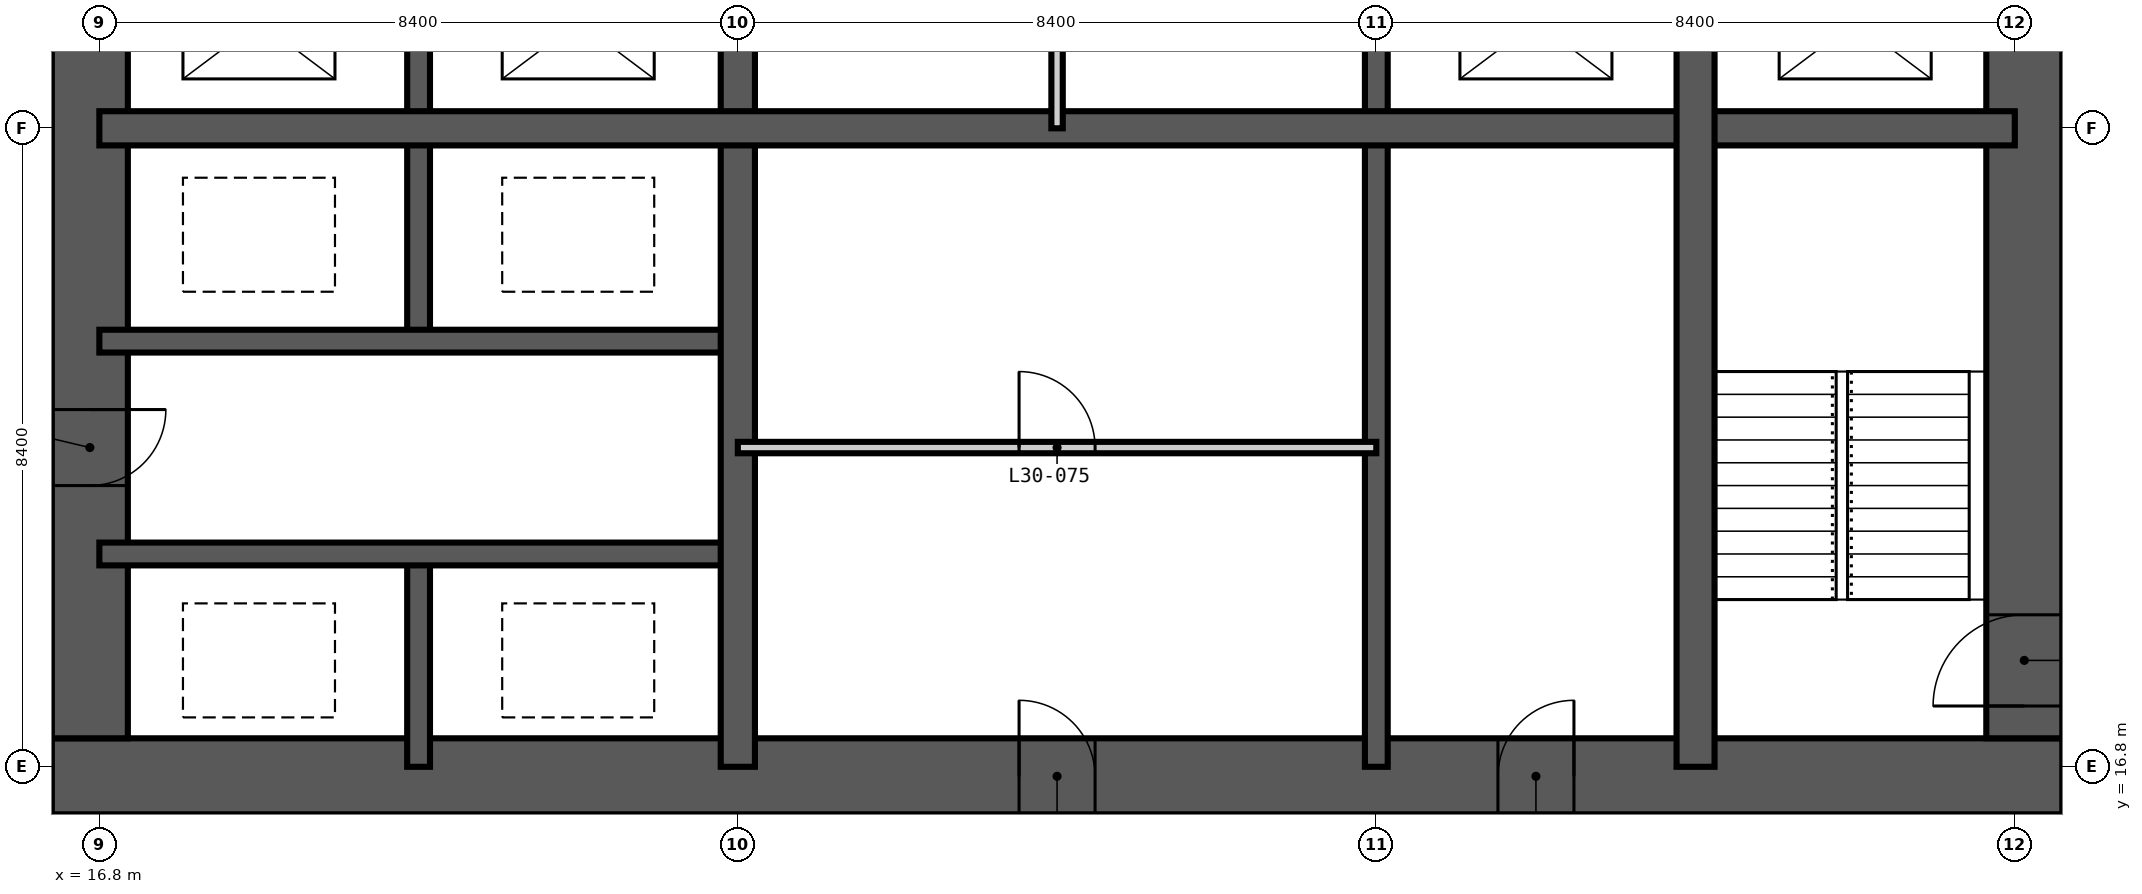
"""IFC4 building model, lengths in metres.
Left out: names, types, materials, properties, quantities, classifications, styles, units other than length and angle.
Written with IfcOpenShell. Run it as: python <this file> out.ifc"""

import sys

from ifc_helpers import new_model, si_unit, direction, frame, frame_2d, origin, place, context, subcontext, project, spatial, rectangle, extrude, element, fill, save


model = new_model("IFC4")
c1 = context("Model", 3, precision=1e-05, world=origin(), true_north=direction((0.0, 1.0)))
c2 = subcontext(c1, "Body", "Model", "MODEL_VIEW")
j1 = project(units=[si_unit("LENGTHUNIT", "METRE"), si_unit("PLANEANGLEUNIT", "RADIAN")], contexts=[c1])
p1 = place(None, origin())
s1 = spatial("IfcSite", under=j1, at=p1, CompositionType="ELEMENT")
p2 = place(p1, origin())
s2 = spatial("IfcBuilding", under=s1, at=p2, CompositionType="ELEMENT")
p3 = place(p2, frame((0.0, 0.0, 118.8)))
s3 = spatial("IfcBuildingStorey", under=s2, at=p3, CompositionType="ELEMENT", Elevation=118.8)
p4 = place(p3, frame((16.175, 16.675, -0.35), z_axis=(0.0, 0.0, 1.0), x_axis=(1.0, 0.0, 0.0)))
e1 = element("IfcWall", 1, at=p4, inside=s3, PredefinedType="SHEAR", context=c2, shape_type="SweptSolid", body=[
    extrude(rectangle(XDim=26.45, YDim=1.0, at=frame_2d((13.225, 0.0))), origin(), (0.0, 0.0, 1.0), 3.6),
])
p5 = place(p4, frame((12.725, 0.0, 0.35)))
e2 = element("IfcOpeningElement", 2, at=p5, cuts=e1, PredefinedType="OPENING", context=c2, shape_type="SweptSolid", body=[
    extrude(rectangle(XDim=1.0, YDim=2.1, at=frame_2d((0.5, 1.05))), frame((0.0, 0.51, 0.0), z_axis=(0.0, -1.0, 0.0), x_axis=(1.0, 0.0, 0.0)), (0.0, 0.0, 1.0), 1.02),
])
p6 = place(p4, frame((19.025, 0.0, 0.35)))
e3 = element("IfcOpeningElement", 3, at=p6, cuts=e1, PredefinedType="OPENING", context=c2, shape_type="SweptSolid", body=[
    extrude(rectangle(XDim=1.0, YDim=2.1, at=frame_2d((0.5, 1.05))), frame((0.0, 0.51, 0.0), z_axis=(0.0, -1.0, 0.0), x_axis=(1.0, 0.0, 0.0)), (0.0, 0.0, 1.0), 1.02),
])
p7 = place(p3, frame((42.125, 17.175, -0.35), z_axis=(0.0, 0.0, 1.0), x_axis=(0.0, 1.0, 0.0)))
e4 = element("IfcWall", 4, at=p7, inside=s3, PredefinedType="SHEAR", context=c2, shape_type="SweptSolid", body=[
    extrude(rectangle(XDim=24.45, YDim=1.0, at=frame_2d((12.225, 0.0))), origin(), (0.0, 0.0, 1.0), 3.6),
])
p8 = place(p7, frame((0.425, 0.0, 0.35)))
e5 = element("IfcOpeningElement", 5, at=p8, cuts=e4, PredefinedType="OPENING", context=c2, shape_type="SweptSolid", body=[
    extrude(rectangle(XDim=1.2, YDim=2.2, at=frame_2d((0.6, 1.1))), frame((0.0, 0.51, 0.0), z_axis=(0.0, -1.0, 0.0), x_axis=(1.0, 0.0, 0.0)), (0.0, 0.0, 1.0), 1.02),
])
p9 = place(p7, frame((11.325, 0.0, 0.35)))
e6 = element("IfcOpeningElement", 6, at=p9, cuts=e4, PredefinedType="OPENING", context=c2, shape_type="SweptSolid", body=[
    extrude(rectangle(XDim=1.8, YDim=2.2, at=frame_2d((0.9, 1.1))), frame((0.0, 0.51, 0.0), z_axis=(0.0, -1.0, 0.0), x_axis=(1.0, 0.0, 0.0)), (0.0, 0.0, 1.0), 1.02),
])
p10 = place(p7, frame((20.125, 0.0, 0.35)))
e7 = element("IfcOpeningElement", 7, at=p10, cuts=e4, PredefinedType="OPENING", context=c2, shape_type="SweptSolid", body=[
    extrude(rectangle(XDim=1.0, YDim=2.1, at=frame_2d((0.5, 1.05))), frame((0.0, 0.51, 0.0), z_axis=(0.0, -1.0, 0.0), x_axis=(1.0, 0.0, 0.0)), (0.0, 0.0, 1.0), 1.02),
])
p11 = place(p3, frame((16.675, 41.625, -0.35), z_axis=(0.0, 0.0, 1.0), x_axis=(0.0, -1.0, 0.0)))
e8 = element("IfcWall", 8, at=p11, inside=s3, PredefinedType="SHEAR", context=c2, shape_type="SweptSolid", body=[
    extrude(rectangle(XDim=24.45, YDim=1.0, at=frame_2d((12.225, 0.0))), origin(), (0.0, 0.0, 1.0), 3.6),
])
p12 = place(p11, frame((11.325, 0.0, 0.35)))
e9 = element("IfcOpeningElement", 9, at=p12, cuts=e8, PredefinedType="OPENING", context=c2, shape_type="SweptSolid", body=[
    extrude(rectangle(XDim=1.8, YDim=2.2, at=frame_2d((0.9, 1.1))), frame((0.0, 0.51, 0.0), z_axis=(0.0, -1.0, 0.0), x_axis=(1.0, 0.0, 0.0)), (0.0, 0.0, 1.0), 1.02),
])
p13 = place(p11, frame((20.125, 0.0, 0.35)))
e10 = element("IfcOpeningElement", 10, at=p13, cuts=e8, PredefinedType="OPENING", context=c2, shape_type="SweptSolid", body=[
    extrude(rectangle(XDim=1.0, YDim=2.1, at=frame_2d((0.5, 1.05))), frame((0.0, 0.51, 0.0), z_axis=(0.0, -1.0, 0.0), x_axis=(1.0, 0.0, 0.0)), (0.0, 0.0, 1.0), 1.02),
])
p14 = place(p11, frame((5.425, 0.0, 0.35)))
e11 = element("IfcOpeningElement", 11, at=p14, cuts=e8, PredefinedType="OPENING", context=c2, shape_type="SweptSolid", body=[
    extrude(rectangle(XDim=1.0, YDim=2.1, at=frame_2d((0.5, 1.05))), frame((0.0, 0.51, 0.0), z_axis=(0.0, -1.0, 0.0), x_axis=(1.0, 0.0, 0.0)), (0.0, 0.0, 1.0), 1.02),
])
p15 = place(p3, frame((21.0, 16.8, -0.35), z_axis=(0.0, 0.0, 1.0), x_axis=(0.0, 1.0, 0.0)))
e12 = element("IfcWall", 12, at=p15, inside=s3, PredefinedType="SHEAR", context=c2, shape_type="SweptSolid", body=[
    extrude(rectangle(XDim=2.8, YDim=0.3, at=frame_2d((1.4, 0.0))), origin(), (0.0, 0.0, 1.0), 3.6),
])
p16 = place(p3, frame((21.0, 22.4, -0.35), z_axis=(0.0, 0.0, 1.0), x_axis=(0.0, 1.0, 0.0)))
e13 = element("IfcWall", 13, at=p16, inside=s3, PredefinedType="SHEAR", context=c2, shape_type="SweptSolid", body=[
    extrude(rectangle(XDim=5.6, YDim=0.3, at=frame_2d((2.8, 0.0))), origin(), (0.0, 0.0, 1.0), 3.6),
])
p17 = place(p3, frame((33.6, 16.8, -0.35), z_axis=(0.0, 0.0, 1.0), x_axis=(0.0, 1.0, 0.0)))
e14 = element("IfcWall", 14, at=p17, inside=s3, PredefinedType="SHEAR", context=c2, shape_type="SweptSolid", body=[
    extrude(rectangle(XDim=25.2, YDim=0.3, at=frame_2d((12.6, 0.0))), origin(), (0.0, 0.0, 1.0), 3.6),
])
p18 = place(p17, frame((22.5, 0.0, 0.35)))
e15 = element("IfcOpeningElement", 15, at=p18, cuts=e14, PredefinedType="OPENING", context=c2, shape_type="SweptSolid", body=[
    extrude(rectangle(XDim=1.2, YDim=2.2, at=frame_2d((0.6, 1.1))), frame((0.0, 0.16, 0.0), z_axis=(0.0, -1.0, 0.0), x_axis=(1.0, 0.0, 0.0)), (0.0, 0.0, 1.0), 0.32),
])
p19 = place(p17, frame((18.3, 0.0, 0.35)))
e16 = element("IfcOpeningElement", 16, at=p19, cuts=e14, PredefinedType="OPENING", context=c2, shape_type="SweptSolid", body=[
    extrude(rectangle(XDim=1.2, YDim=2.2, at=frame_2d((0.6, 1.1))), frame((0.0, 0.16, 0.0), z_axis=(0.0, -1.0, 0.0), x_axis=(1.0, 0.0, 0.0)), (0.0, 0.0, 1.0), 0.32),
])
for number, where, z_axis, x_axis in (
    (17, (16.8, 19.6, -0.35), (0.0, 0.0, 1.0), (1.0, 0.0, 0.0)),
    (18, (16.8, 22.4, -0.35), (0.0, 0.0, 1.0), (1.0, 0.0, 0.0)),
):
    element("IfcWall", number, at=place(p3, frame(where, z_axis=z_axis, x_axis=x_axis)), inside=s3, PredefinedType="SHEAR", context=c2, shape_type="SweptSolid", body=[
        extrude(rectangle(XDim=8.4, YDim=0.3, at=frame_2d((4.2, 0.0))), origin(), (0.0, 0.0, 1.0), 3.6),
    ])
p20 = place(p3, frame((25.2, 16.8, -0.35), z_axis=(0.0, 0.0, 1.0), x_axis=(0.0, 1.0, 0.0)))
e19 = element("IfcWall", 19, at=p20, inside=s3, PredefinedType="SHEAR", context=c2, shape_type="SweptSolid", body=[
    extrude(rectangle(XDim=25.2, YDim=0.45, at=frame_2d((12.6, 0.0))), origin(), (0.0, 0.0, 1.0), 3.6),
])
p21 = place(p20, frame((12.1, 0.0, 0.35)))
e20 = element("IfcOpeningElement", 20, at=p21, cuts=e19, PredefinedType="OPENING", context=c2, shape_type="SweptSolid", body=[
    extrude(rectangle(XDim=1.0, YDim=2.1, at=frame_2d((0.5, 1.05))), frame((0.0, 0.235, 0.0), z_axis=(0.0, -1.0, 0.0), x_axis=(1.0, 0.0, 0.0)), (0.0, 0.0, 1.0), 0.47),
])
p22 = place(p3, frame((16.8, 25.2, -0.35), z_axis=(0.0, 0.0, 1.0), x_axis=(1.0, 0.0, 0.0)))
e21 = element("IfcWall", 21, at=p22, inside=s3, PredefinedType="SHEAR", context=c2, shape_type="SweptSolid", body=[
    extrude(rectangle(XDim=25.2, YDim=0.45, at=frame_2d((12.6, 0.0))), origin(), (0.0, 0.0, 1.0), 3.6),
])
p23 = place(p3, frame((37.8, 16.8, -0.35), z_axis=(0.0, 0.0, 1.0), x_axis=(0.0, 1.0, 0.0)))
e22 = element("IfcWall", 22, at=p23, inside=s3, PredefinedType="SHEAR", context=c2, shape_type="SweptSolid", body=[
    extrude(rectangle(XDim=11.2, YDim=0.5, at=frame_2d((5.6, 0.0))), origin(), (0.0, 0.0, 1.0), 3.6),
])
p24 = place(p3, frame((29.4, 25.2, 0.0), z_axis=(0.0, 0.0, 1.0), x_axis=(0.0, 1.0, 0.0)))
e23 = element("IfcWall", 23, at=p24, inside=s3, PredefinedType="PARTITIONING", context=c2, shape_type="SweptSolid", body=[
    extrude(rectangle(XDim=2.8, YDim=0.15, at=frame_2d((1.4, 0.0))), origin(), (0.0, 0.0, 1.0), 3.25),
])
p25 = place(p3, frame((25.2, 21.0, 0.0), z_axis=(0.0, 0.0, 1.0), x_axis=(1.0, 0.0, 0.0)))
e24 = element("IfcWall", 24, at=p25, inside=s3, PredefinedType="PARTITIONING", context=c2, shape_type="SweptSolid", body=[
    extrude(rectangle(XDim=8.4, YDim=0.15, at=frame_2d((4.2, 0.0))), origin(), (0.0, 0.0, 1.0), 3.25),
])
p26 = place(p25, frame((3.7, 0.0, 0.0)))
e25 = element("IfcOpeningElement", 25, at=p26, cuts=e24, PredefinedType="OPENING", context=c2, shape_type="SweptSolid", body=[
    extrude(rectangle(XDim=1.0, YDim=2.1, at=frame_2d((0.5, 1.05))), frame((0.0, 0.085, 0.0), z_axis=(0.0, -1.0, 0.0), x_axis=(1.0, 0.0, 0.0)), (0.0, 0.0, 1.0), 0.17),
])
p27 = place(p8, origin())
e26 = element("IfcDoor", 26, at=p27, inside=s3, OperationType="SINGLE_SWING_LEFT", PredefinedType="DOOR", context=c2, shape_type="SweptSolid", body=[
    extrude(rectangle(XDim=1.2, YDim=2.2, at=frame_2d((0.6, 1.1))), frame((0.0, 0.025, 0.0), z_axis=(0.0, -1.0, 0.0), x_axis=(1.0, 0.0, 0.0)), (0.0, 0.0, 1.0), 0.05),
])
fill(e5, e26)
p28 = place(p13, origin())
e27 = element("IfcDoor", 27, at=p28, inside=s3, OperationType="SINGLE_SWING_LEFT", PredefinedType="DOOR", context=c2, shape_type="SweptSolid", body=[
    extrude(rectangle(XDim=1.0, YDim=2.1, at=frame_2d((0.5, 1.05))), frame((0.0, 0.025, 0.0), z_axis=(0.0, -1.0, 0.0), x_axis=(1.0, 0.0, 0.0)), (0.0, 0.0, 1.0), 0.05),
])
fill(e10, e27)
p29 = place(p5, origin())
e28 = element("IfcDoor", 28, at=p29, inside=s3, OperationType="SINGLE_SWING_LEFT", PredefinedType="DOOR", context=c2, shape_type="SweptSolid", body=[
    extrude(rectangle(XDim=1.0, YDim=2.1, at=frame_2d((0.5, 1.05))), frame((0.0, 0.025, 0.0), z_axis=(0.0, -1.0, 0.0), x_axis=(1.0, 0.0, 0.0)), (0.0, 0.0, 1.0), 0.05),
])
fill(e2, e28)
p30 = place(p26, origin())
e29 = element("IfcDoor", 29, at=p30, inside=s3, OperationType="SINGLE_SWING_LEFT", PredefinedType="DOOR", context=c2, shape_type="SweptSolid", body=[
    extrude(rectangle(XDim=1.0, YDim=2.1, at=frame_2d((0.5, 1.05))), frame((0.0, 0.025, 0.0), z_axis=(0.0, -1.0, 0.0), x_axis=(1.0, 0.0, 0.0)), (0.0, 0.0, 1.0), 0.05),
])
fill(e25, e29)
p31 = place(p6, origin())
e30 = element("IfcDoor", 30, at=p31, inside=s3, OperationType="SINGLE_SWING_RIGHT", PredefinedType="DOOR", context=c2, shape_type="SweptSolid", body=[
    extrude(rectangle(XDim=1.0, YDim=2.1, at=frame_2d((0.5, 1.05))), frame((0.0, 0.025, 0.0), z_axis=(0.0, -1.0, 0.0), x_axis=(1.0, 0.0, 0.0)), (0.0, 0.0, 1.0), 0.05),
])
fill(e3, e30)
save(model, sys.argv[1])
